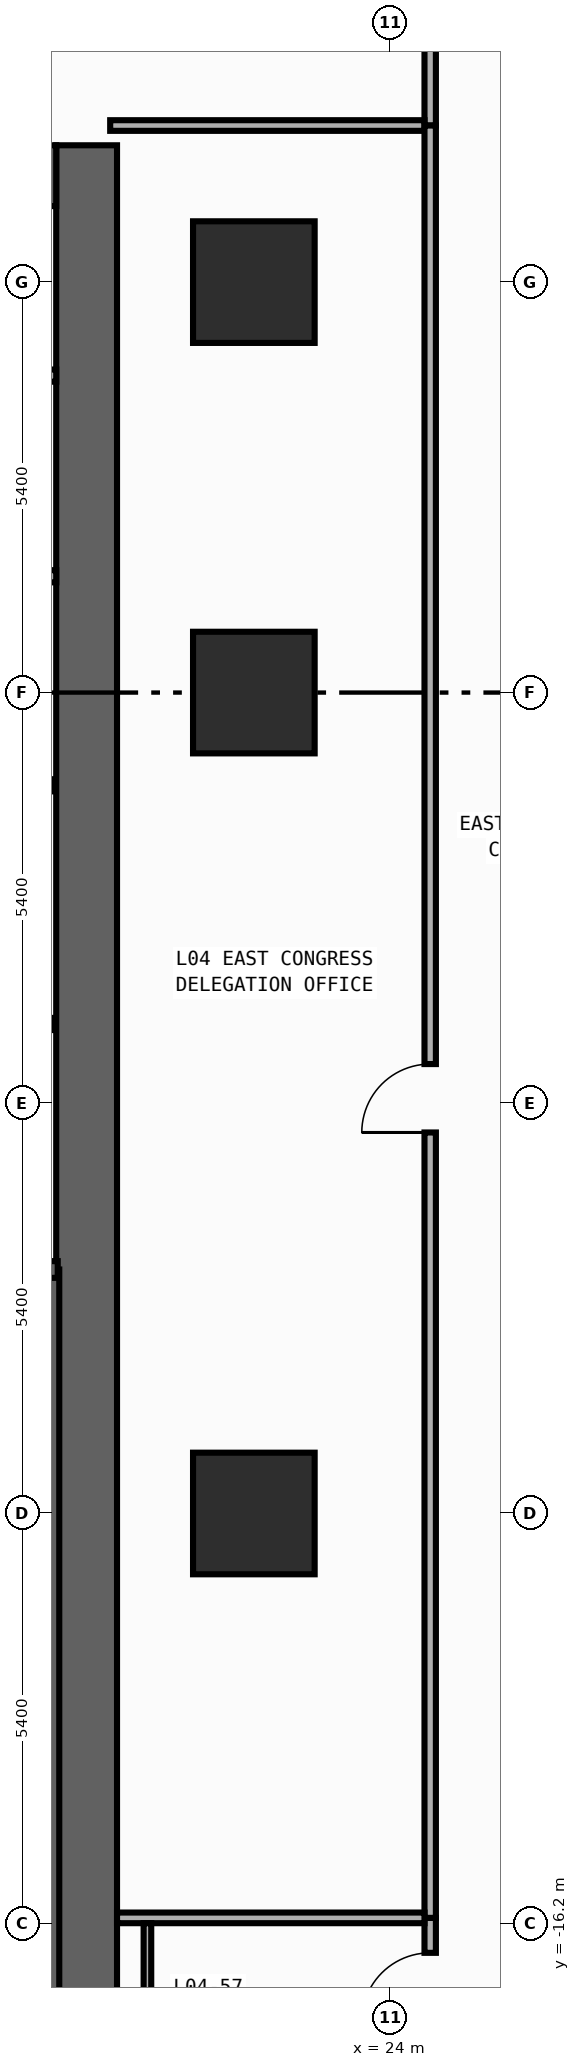
"""IFC4 building model, lengths in metres.
Left out: names, types, materials, properties, quantities, classifications, styles, units other than length and angle.
Written with IfcOpenShell. Run it as: python <this file> out.ifc"""

import sys

from ifc_helpers import new_model, si_unit, direction, frame, frame_2d, origin, origin_2d, place, context, subcontext, project, spatial, rectangle, extrude, element, fill, save


model = new_model("IFC4")
c1 = context("Model", 3, precision=1e-05, world=origin(), true_north=direction((0.0, 1.0)))
c2 = subcontext(c1, "Body", "Model", "MODEL_VIEW")
j1 = project(units=[si_unit("LENGTHUNIT", "METRE"), si_unit("PLANEANGLEUNIT", "RADIAN")], contexts=[c1])
p1 = place(None, origin())
s1 = spatial("IfcSite", under=j1, at=p1, CompositionType="ELEMENT")
p2 = place(p1, origin())
s2 = spatial("IfcBuilding", under=s1, at=p2, CompositionType="ELEMENT")
p3 = place(p2, frame((0.0, 0.0, 16.0)))
s3 = spatial("IfcBuildingStorey", under=s2, at=p3, CompositionType="ELEMENT", Elevation=16.0)
p4 = place(p3, frame((20.0, -19.8, 0.0), z_axis=(0.0, 0.0, 1.0), x_axis=(0.0, 1.0, 0.0)))
e1 = element("IfcWall", 1, at=p4, inside=s3, PredefinedType="SHEAR", context=c2, shape_type="SweptSolid", body=[
    extrude(rectangle(XDim=27.0, YDim=0.8, at=frame_2d((13.5, 0.0))), origin(), (0.0, 0.0, 1.0), 4.55),
])
p5 = place(p3, frame((12.8, 6.8, 0.0), z_axis=(0.0, 0.0, 1.0), x_axis=(1.0, 0.0, 0.0)))
e2 = element("IfcWall", 2, at=p5, inside=s3, PredefinedType="SHEAR", context=c2, shape_type="SweptSolid", body=[
    extrude(rectangle(XDim=6.8, YDim=0.8, at=frame_2d((3.4, 0.0))), origin(), (0.0, 0.0, 1.0), 4.55),
])
p6 = place(p3, frame((19.53, -18.89, 0.0), z_axis=(0.0, 0.0, 1.0), x_axis=(0.0, 1.0, 0.0)))
e3 = element("IfcWall", 3, at=p6, inside=s3, PredefinedType="SHEAR", context=c2, shape_type="SweptSolid", body=[
    extrude(rectangle(XDim=11.3, YDim=0.22, at=frame_2d((5.65, 0.0))), origin(), (0.0, 0.0, 1.0), 4.55),
])
p7 = place(p3, frame((19.62, -7.59, 0.0), z_axis=(0.0, 0.0, 1.0), x_axis=(-1.0, 0.0, 0.0)))
e4 = element("IfcWall", 4, at=p7, inside=s3, PredefinedType="SHEAR", context=c2, shape_type="SweptSolid", body=[
    extrude(rectangle(XDim=3.915, YDim=0.22, at=frame_2d((1.958, 0.0))), origin(), (0.0, 0.0, 1.0), 4.55),
])
p8 = place(p7, frame((1.08, 0.0, 0.0)))
e5 = element("IfcOpeningElement", 5, at=p8, cuts=e4, PredefinedType="OPENING", context=c2, shape_type="SweptSolid", body=[
    extrude(rectangle(XDim=1.1, YDim=2.2, at=frame_2d((0.55, 1.1))), frame((0.0, 0.12, 0.0), z_axis=(0.0, -1.0, 0.0), x_axis=(1.0, 0.0, 0.0)), (0.0, 0.0, 1.0), 0.24),
])
for number, where, z_axis, x_axis in (
    (6, (22.2, -10.8, 0.0), (0.0, 0.0, 1.0), (1.0, 0.0, 0.0)),
    (7, (22.2, 0.0, 0.0), (0.0, 0.0, 1.0), (1.0, 0.0, 0.0)),
    (8, (22.2, 5.4, 0.0), (0.0, 0.0, 1.0), (1.0, 0.0, 0.0)),
):
    element("IfcColumn", number, at=place(p3, frame(where, z_axis=z_axis, x_axis=x_axis)), inside=s3, PredefinedType="COLUMN", context=c2, shape_type="SweptSolid", body=[
        extrude(rectangle(XDim=1.6, YDim=1.6, at=origin_2d()), origin(), (0.0, 0.0, 1.0), 5.0),
    ])
for number, where, z_axis, x_axis in (
    (9, (17.31, 4.17, 0.0), (0.0, 0.0, 1.0), (1.0, 0.0, 0.0)),
    (10, (17.31, 1.53, 0.0), (0.0, 0.0, 1.0), (1.0, 0.0, 0.0)),
):
    element("IfcWall", number, at=place(p3, frame(where, z_axis=z_axis, x_axis=x_axis)), inside=s3, PredefinedType="PARTITIONING", context=c2, shape_type="SweptSolid", body=[
        extrude(rectangle(XDim=2.29, YDim=0.16, at=frame_2d((1.145, 0.0))), origin(), (0.0, 0.0, 1.0), 4.55),
    ])
p9 = place(p3, frame((24.52, 7.46, 0.0), z_axis=(0.0, 0.0, 1.0), x_axis=(0.0, 1.0, 0.0)))
e11 = element("IfcWall", 11, at=p9, inside=s3, PredefinedType="PARTITIONING", context=c2, shape_type="SweptSolid", body=[
    extrude(rectangle(XDim=18.498, YDim=0.15, at=frame_2d((9.249, 0.0))), origin(), (0.0, 0.0, 1.0), 4.55),
])
p10 = place(p9, frame((11.512, 0.0, 0.0)))
e12 = element("IfcOpeningElement", 12, at=p10, cuts=e11, PredefinedType="OPENING", context=c2, shape_type="SweptSolid", body=[
    extrude(rectangle(XDim=0.9, YDim=2.15, at=frame_2d((0.45, 1.075))), frame((0.0, 0.085, 0.0), z_axis=(0.0, -1.0, 0.0), x_axis=(1.0, 0.0, 0.0)), (0.0, 0.0, 1.0), 0.17),
])
p11 = place(p3, frame((20.31, 7.46, 0.0), z_axis=(0.0, 0.0, 1.0), x_axis=(1.0, 0.0, 0.0)))
e13 = element("IfcWall", 13, at=p11, inside=s3, PredefinedType="PARTITIONING", context=c2, shape_type="SweptSolid", body=[
    extrude(rectangle(XDim=4.135, YDim=0.14, at=frame_2d((2.067, 0.0))), origin(), (0.0, 0.0, 1.0), 4.55),
])
p12 = place(p3, frame((24.52, -20.175, 0.0), z_axis=(0.0, 0.0, 1.0), x_axis=(0.0, 1.0, 0.0)))
e14 = element("IfcWall", 14, at=p12, inside=s3, PredefinedType="PARTITIONING", context=c2, shape_type="SweptSolid", body=[
    extrude(rectangle(XDim=4.055, YDim=0.15, at=frame_2d((2.027, 0.0))), origin(), (0.0, 0.0, 1.0), 4.55),
])
p13 = place(p12, frame((2.695, 0.0, 0.0)))
e15 = element("IfcOpeningElement", 15, at=p13, cuts=e14, PredefinedType="OPENING", context=c2, shape_type="SweptSolid", body=[
    extrude(rectangle(XDim=0.9, YDim=2.15, at=frame_2d((0.45, 1.075))), frame((0.0, 0.085, 0.0), z_axis=(0.0, -1.0, 0.0), x_axis=(1.0, 0.0, 0.0)), (0.0, 0.0, 1.0), 0.17),
])
p14 = place(p3, frame((24.52, -16.12, 0.0), z_axis=(0.0, 0.0, 1.0), x_axis=(0.0, 1.0, 0.0)))
e16 = element("IfcWall", 16, at=p14, inside=s3, PredefinedType="PARTITIONING", context=c2, shape_type="SweptSolid", body=[
    extrude(rectangle(XDim=23.58, YDim=0.15, at=frame_2d((11.79, 0.0))), origin(), (0.0, 0.0, 1.0), 4.55),
])
p15 = place(p14, frame((10.333, 0.0, 0.0)))
e17 = element("IfcOpeningElement", 17, at=p15, cuts=e16, PredefinedType="OPENING", context=c2, shape_type="SweptSolid", body=[
    extrude(rectangle(XDim=0.9, YDim=2.15, at=frame_2d((0.45, 1.075))), frame((0.0, 0.085, 0.0), z_axis=(0.0, -1.0, 0.0), x_axis=(1.0, 0.0, 0.0)), (0.0, 0.0, 1.0), 0.17),
])
p16 = place(p3, frame((20.4, -16.12, 0.0), z_axis=(0.0, 0.0, 1.0), x_axis=(1.0, 0.0, 0.0)))
e18 = element("IfcWall", 18, at=p16, inside=s3, PredefinedType="PARTITIONING", context=c2, shape_type="SweptSolid", body=[
    extrude(rectangle(XDim=4.045, YDim=0.14, at=frame_2d((2.022, 0.0))), origin(), (0.0, 0.0, 1.0), 4.55),
])
p17 = place(p3, frame((20.8, -20.025, 0.0), z_axis=(0.0, 0.0, 1.0), x_axis=(0.0, 1.0, 0.0)))
e19 = element("IfcWall", 19, at=p17, inside=s3, PredefinedType="PARTITIONING", context=c2, shape_type="SweptSolid", body=[
    extrude(rectangle(XDim=3.835, YDim=0.1, at=frame_2d((1.917, 0.0))), origin(), (0.0, 0.0, 1.0), 4.55),
])
p18 = place(p13, origin())
e20 = element("IfcDoor", 20, at=p18, inside=s3, OperationType="SINGLE_SWING_LEFT", PredefinedType="DOOR", context=c2, shape_type="SweptSolid", body=[
    extrude(rectangle(XDim=0.9, YDim=2.15, at=frame_2d((0.45, 1.075))), frame((0.0, 0.025, 0.0), z_axis=(0.0, -1.0, 0.0), x_axis=(1.0, 0.0, 0.0)), (0.0, 0.0, 1.0), 0.05),
])
fill(e15, e20)
p19 = place(p15, origin())
e21 = element("IfcDoor", 21, at=p19, inside=s3, OperationType="SINGLE_SWING_LEFT", PredefinedType="DOOR", context=c2, shape_type="SweptSolid", body=[
    extrude(rectangle(XDim=0.9, YDim=2.15, at=frame_2d((0.45, 1.075))), frame((0.0, 0.025, 0.0), z_axis=(0.0, -1.0, 0.0), x_axis=(1.0, 0.0, 0.0)), (0.0, 0.0, 1.0), 0.05),
])
fill(e17, e21)
save(model, sys.argv[1])
